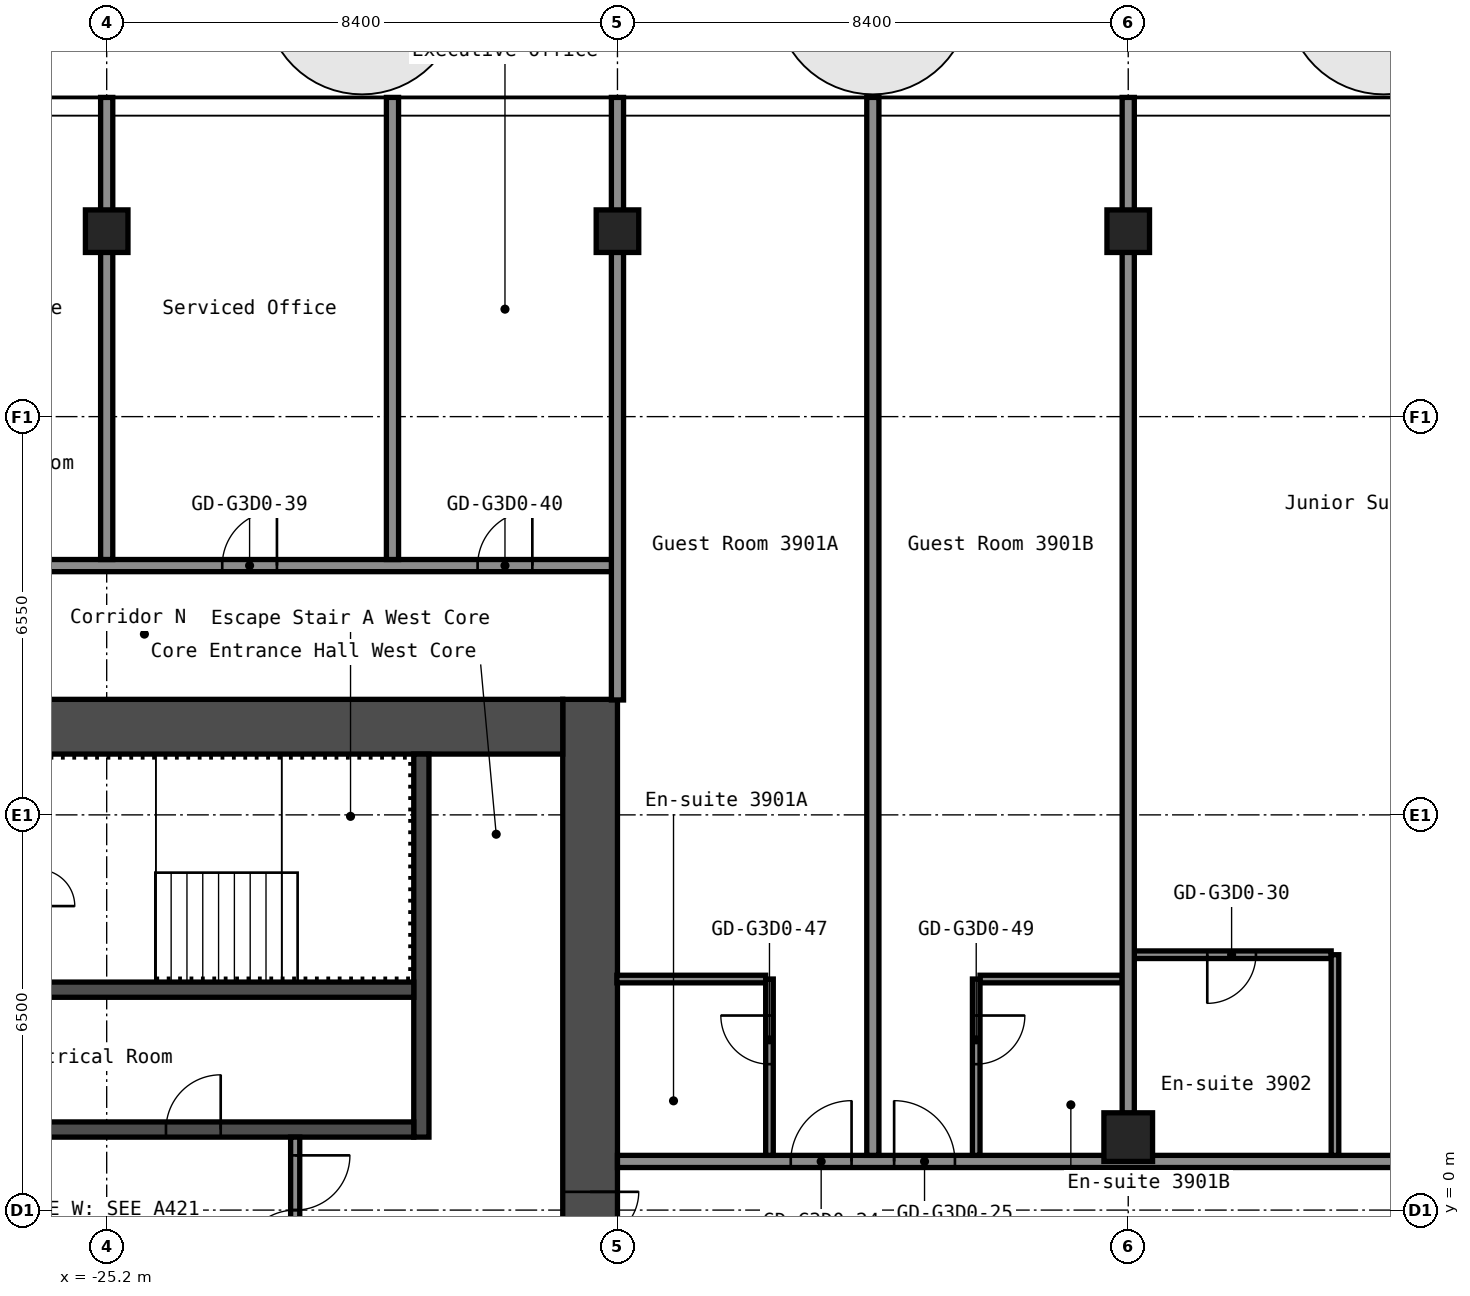
"""IFC4 building model, lengths in metres.
Left out: names, types, materials, properties, quantities, classifications, styles, units other than length and angle.
Written with IfcOpenShell. Run it as: python <this file> out.ifc"""

import sys

from ifc_helpers import new_model, si_unit, direction, frame, frame_2d, origin, origin_2d, place, context, subcontext, project, spatial, rectangle, hollow_rectangle, extrude, element, fill, save


model = new_model("IFC4")
c1 = context("Model", 3, precision=1e-05, world=origin(), true_north=direction((0.0, 1.0)))
c2 = subcontext(c1, "Body", "Model", "MODEL_VIEW")
j1 = project(units=[si_unit("LENGTHUNIT", "METRE"), si_unit("PLANEANGLEUNIT", "RADIAN")], contexts=[c1])
p1 = place(None, origin())
s1 = spatial("IfcSite", under=j1, at=p1, CompositionType="ELEMENT")
p2 = place(p1, origin())
s2 = spatial("IfcBuilding", under=s1, at=p2, CompositionType="ELEMENT")
p3 = place(p2, frame((0.0, 0.0, 140.6)))
s3 = spatial("IfcBuildingStorey", under=s2, at=p3, CompositionType="ELEMENT", Elevation=140.6)
for number, where, z_axis, x_axis in (
    (1, (-25.2, 16.1, 0.0), (0.0, 0.0, 1.0), (1.0, 0.0, 0.0)),
    (2, (-16.8, 16.1, 0.0), (0.0, 0.0, 1.0), (1.0, 0.0, 0.0)),
):
    element("IfcColumn", number, at=place(p3, frame(where, z_axis=z_axis, x_axis=x_axis)), inside=s3, PredefinedType="COLUMN", context=c2, shape_type="SweptSolid", body=[
        extrude(hollow_rectangle(XDim=0.7, YDim=0.7, WallThickness=0.028, at=origin_2d()), origin(), (0.0, 0.0, 1.0), 2.75),
    ])
p4 = place(p3, frame((-8.4, 1.2, 0.0), z_axis=(0.0, 0.0, 1.0), x_axis=(1.0, 0.0, 0.0)))
e3 = element("IfcColumn", 3, at=p4, inside=s3, PredefinedType="COLUMN", context=c2, shape_type="SweptSolid", body=[
    extrude(hollow_rectangle(XDim=0.8, YDim=0.8, WallThickness=0.032, at=origin_2d()), origin(), (0.0, 0.0, 1.0), 2.75),
])
p5 = place(p3, frame((-8.4, 16.1, 0.0), z_axis=(0.0, 0.0, 1.0), x_axis=(1.0, 0.0, 0.0)))
e4 = element("IfcColumn", 4, at=p5, inside=s3, PredefinedType="COLUMN", context=c2, shape_type="SweptSolid", body=[
    extrude(hollow_rectangle(XDim=0.7, YDim=0.7, WallThickness=0.028, at=origin_2d()), origin(), (0.0, 0.0, 1.0), 2.75),
])
p6 = place(p3, frame((-17.25, -8.4, 0.0), z_axis=(0.0, 0.0, 1.0), x_axis=(0.0, 1.0, 0.0)))
e5 = element("IfcWall", 5, at=p6, inside=s3, PredefinedType="SHEAR", context=c2, shape_type="SweptSolid", body=[
    extrude(rectangle(XDim=16.8, YDim=0.9, at=frame_2d((8.4, 0.0))), origin(), (0.0, 0.0, 1.0), 2.75),
])
p7 = place(p6, frame((7.1, 0.0, 0.0)))
e6 = element("IfcOpeningElement", 6, at=p7, cuts=e5, PredefinedType="OPENING", context=c2, shape_type="SweptSolid", body=[
    extrude(rectangle(XDim=1.6, YDim=2.1, at=frame_2d((0.8, 1.05))), frame((0.0, 0.46, 0.0), z_axis=(0.0, -1.0, 0.0), x_axis=(1.0, 0.0, 0.0)), (0.0, 0.0, 1.0), 0.92),
])
p8 = place(p3, frame((-32.7, 7.95, 0.0), z_axis=(0.0, 0.0, 1.0), x_axis=(1.0, 0.0, 0.0)))
e7 = element("IfcWall", 7, at=p8, inside=s3, PredefinedType="SHEAR", context=c2, shape_type="SweptSolid", body=[
    extrude(rectangle(XDim=15.0, YDim=0.9, at=frame_2d((7.5, 0.0))), origin(), (0.0, 0.0, 1.0), 2.75),
])
p9 = place(p8, frame((3.4, 0.0, 0.0)))
e8 = element("IfcOpeningElement", 8, at=p9, cuts=e7, PredefinedType="OPENING", context=c2, shape_type="SweptSolid", body=[
    extrude(rectangle(XDim=1.2, YDim=2.1, at=frame_2d((0.6, 1.05))), frame((0.0, 0.46, 0.0), z_axis=(0.0, -1.0, 0.0), x_axis=(1.0, 0.0, 0.0)), (0.0, 0.0, 1.0), 0.92),
])
p10 = place(p8, frame((0.75, 0.0, 0.0)))
e9 = element("IfcOpeningElement", 9, at=p10, cuts=e7, PredefinedType="OPENING", context=c2, shape_type="SweptSolid", body=[
    extrude(rectangle(XDim=0.9, YDim=2.1, at=frame_2d((0.45, 1.05))), frame((0.0, 0.46, 0.0), z_axis=(0.0, -1.0, 0.0), x_axis=(1.0, 0.0, 0.0)), (0.0, 0.0, 1.0), 0.92),
])
p11 = place(p3, frame((-20.025, 1.2, 0.0), z_axis=(0.0, 0.0, 1.0), x_axis=(0.0, 1.0, 0.0)))
e10 = element("IfcWall", 10, at=p11, inside=s3, PredefinedType="SHEAR", context=c2, shape_type="SweptSolid", body=[
    extrude(rectangle(XDim=6.3, YDim=0.25, at=frame_2d((3.15, 0.0))), origin(), (0.0, 0.0, 1.0), 2.75),
])
p12 = place(p3, frame((-27.65, 1.325, 0.0), z_axis=(0.0, 0.0, 1.0), x_axis=(1.0, 0.0, 0.0)))
e11 = element("IfcWall", 11, at=p12, inside=s3, PredefinedType="SHEAR", context=c2, shape_type="SweptSolid", body=[
    extrude(rectangle(XDim=7.5, YDim=0.25, at=frame_2d((3.75, 0.0))), origin(), (0.0, 0.0, 1.0), 2.75),
])
p13 = place(p12, frame((3.425, 0.0, 0.0)))
e12 = element("IfcOpeningElement", 12, at=p13, cuts=e11, PredefinedType="OPENING", context=c2, shape_type="SweptSolid", body=[
    extrude(rectangle(XDim=0.9, YDim=2.1, at=frame_2d((0.45, 1.05))), frame((0.0, 0.135, 0.0), z_axis=(0.0, -1.0, 0.0), x_axis=(1.0, 0.0, 0.0)), (0.0, 0.0, 1.0), 0.27),
])
p14 = place(p3, frame((-27.65, 3.625, 0.0), z_axis=(0.0, 0.0, 1.0), x_axis=(1.0, 0.0, 0.0)))
e13 = element("IfcWall", 13, at=p14, inside=s3, PredefinedType="SHEAR", context=c2, shape_type="SweptSolid", body=[
    extrude(rectangle(XDim=7.5, YDim=0.25, at=frame_2d((3.75, 0.0))), origin(), (0.0, 0.0, 1.0), 2.75),
])
p15 = place(p3, frame((-22.1, -1.2, 0.0), z_axis=(0.0, 0.0, 1.0), x_axis=(0.0, 1.0, 0.0)))
e14 = element("IfcWall", 14, at=p15, inside=s3, PredefinedType="PARTITIONING", context=c2, shape_type="SweptSolid", body=[
    extrude(rectangle(XDim=2.4, YDim=0.15, at=frame_2d((1.2, 0.0))), origin(), (0.0, 0.0, 1.0), 2.75),
])
p16 = place(p15, frame((0.3, 0.0, 0.0)))
e15 = element("IfcOpeningElement", 15, at=p16, cuts=e14, PredefinedType="OPENING", context=c2, shape_type="SweptSolid", body=[
    extrude(rectangle(XDim=1.8, YDim=2.1, at=frame_2d((0.9, 1.05))), frame((0.0, 0.085, 0.0), z_axis=(0.0, -1.0, 0.0), x_axis=(1.0, 0.0, 0.0)), (0.0, 0.0, 1.0), 0.17),
])
p17 = place(p3, frame((-16.8, 0.8, 0.0), z_axis=(0.0, 0.0, 1.0), x_axis=(1.0, 0.0, 0.0)))
e16 = element("IfcWall", 16, at=p17, inside=s3, PredefinedType="PARTITIONING", context=c2, shape_type="SweptSolid", body=[
    extrude(rectangle(XDim=33.6, YDim=0.2, at=frame_2d((16.8, 0.0))), origin(), (0.0, 0.0, 1.0), 2.75),
])
p18 = place(p17, frame((2.85, 0.0, 0.0)))
e17 = element("IfcOpeningElement", 17, at=p18, cuts=e16, PredefinedType="OPENING", context=c2, shape_type="SweptSolid", body=[
    extrude(rectangle(XDim=1.0, YDim=2.1, at=frame_2d((0.5, 1.05))), frame((0.0, 0.11, 0.0), z_axis=(0.0, -1.0, 0.0), x_axis=(1.0, 0.0, 0.0)), (0.0, 0.0, 1.0), 0.22),
])
p19 = place(p17, frame((4.55, 0.0, 0.0)))
e18 = element("IfcOpeningElement", 18, at=p19, cuts=e16, PredefinedType="OPENING", context=c2, shape_type="SweptSolid", body=[
    extrude(rectangle(XDim=1.0, YDim=2.1, at=frame_2d((0.5, 1.05))), frame((0.0, 0.11, 0.0), z_axis=(0.0, -1.0, 0.0), x_axis=(1.0, 0.0, 0.0)), (0.0, 0.0, 1.0), 0.22),
])
p20 = place(p17, frame((13.8, 0.0, 0.0)))
e19 = element("IfcOpeningElement", 19, at=p20, cuts=e16, PredefinedType="OPENING", context=c2, shape_type="SweptSolid", body=[
    extrude(rectangle(XDim=1.0, YDim=2.1, at=frame_2d((0.5, 1.05))), frame((0.0, 0.11, 0.0), z_axis=(0.0, -1.0, 0.0), x_axis=(1.0, 0.0, 0.0)), (0.0, 0.0, 1.0), 0.22),
])
p21 = place(p17, frame((19.65, 0.0, 0.0)))
e20 = element("IfcOpeningElement", 20, at=p21, cuts=e16, PredefinedType="OPENING", context=c2, shape_type="SweptSolid", body=[
    extrude(rectangle(XDim=1.0, YDim=2.1, at=frame_2d((0.5, 1.05))), frame((0.0, 0.11, 0.0), z_axis=(0.0, -1.0, 0.0), x_axis=(1.0, 0.0, 0.0)), (0.0, 0.0, 1.0), 0.22),
])
p22 = place(p17, frame((21.35, 0.0, 0.0)))
e21 = element("IfcOpeningElement", 21, at=p22, cuts=e16, PredefinedType="OPENING", context=c2, shape_type="SweptSolid", body=[
    extrude(rectangle(XDim=1.0, YDim=2.1, at=frame_2d((0.5, 1.05))), frame((0.0, 0.11, 0.0), z_axis=(0.0, -1.0, 0.0), x_axis=(1.0, 0.0, 0.0)), (0.0, 0.0, 1.0), 0.22),
])
p23 = place(p17, frame((27.1, 0.0, 0.0)))
e22 = element("IfcOpeningElement", 22, at=p23, cuts=e16, PredefinedType="OPENING", context=c2, shape_type="SweptSolid", body=[
    extrude(rectangle(XDim=1.0, YDim=2.1, at=frame_2d((0.5, 1.05))), frame((0.0, 0.11, 0.0), z_axis=(0.0, -1.0, 0.0), x_axis=(1.0, 0.0, 0.0)), (0.0, 0.0, 1.0), 0.22),
])
p24 = place(p3, frame((-16.81, 3.8, 0.0), z_axis=(0.0, 0.0, 1.0), x_axis=(1.0, 0.0, 0.0)))
e23 = element("IfcWall", 23, at=p24, inside=s3, PredefinedType="PARTITIONING", context=c2, shape_type="SweptSolid", body=[
    extrude(rectangle(XDim=2.448, YDim=0.125, at=frame_2d((1.224, 0.0))), origin(), (0.0, 0.0, 1.0), 2.75),
])
p25 = place(p3, frame((-10.837, 3.8, 0.0), z_axis=(0.0, 0.0, 1.0), x_axis=(1.0, 0.0, 0.0)))
e24 = element("IfcWall", 24, at=p25, inside=s3, PredefinedType="PARTITIONING", context=c2, shape_type="SweptSolid", body=[
    extrude(rectangle(XDim=2.337, YDim=0.125, at=frame_2d((1.169, 0.0))), origin(), (0.0, 0.0, 1.0), 2.75),
])
p26 = place(p3, frame((-8.3, 4.2, 0.0), z_axis=(0.0, 0.0, 1.0), x_axis=(1.0, 0.0, 0.0)))
e25 = element("IfcWall", 25, at=p26, inside=s3, PredefinedType="PARTITIONING", context=c2, shape_type="SweptSolid", body=[
    extrude(rectangle(XDim=3.238, YDim=0.125, at=frame_2d((1.619, 0.0))), origin(), (0.0, 0.0, 1.0), 2.75),
])
p27 = place(p26, frame((1.2, 0.0, 0.0)))
e26 = element("IfcOpeningElement", 26, at=p27, cuts=e25, PredefinedType="OPENING", context=c2, shape_type="SweptSolid", body=[
    extrude(rectangle(XDim=0.8, YDim=2.1, at=frame_2d((0.4, 1.05))), frame((0.0, 0.073, 0.0), z_axis=(0.0, -1.0, 0.0), x_axis=(1.0, 0.0, 0.0)), (0.0, 0.0, 1.0), 0.145),
])
p28 = place(p3, frame((-42.7, 10.6, 0.0), z_axis=(0.0, 0.0, 1.0), x_axis=(1.0, 0.0, 0.0)))
e27 = element("IfcWall", 27, at=p28, inside=s3, PredefinedType="PARTITIONING", context=c2, shape_type="SweptSolid", body=[
    extrude(rectangle(XDim=25.9, YDim=0.2, at=frame_2d((12.95, 0.0))), origin(), (0.0, 0.0, 1.0), 2.75),
])
p29 = place(p28, frame((1.7, 0.0, 0.0)))
e28 = element("IfcOpeningElement", 28, at=p29, cuts=e27, PredefinedType="OPENING", context=c2, shape_type="SweptSolid", body=[
    extrude(rectangle(XDim=0.9, YDim=2.1, at=frame_2d((0.45, 1.05))), frame((0.0, 0.11, 0.0), z_axis=(0.0, -1.0, 0.0), x_axis=(1.0, 0.0, 0.0)), (0.0, 0.0, 1.0), 0.22),
])
p30 = place(p28, frame((6.1, 0.0, 0.0)))
e29 = element("IfcOpeningElement", 29, at=p30, cuts=e27, PredefinedType="OPENING", context=c2, shape_type="SweptSolid", body=[
    extrude(rectangle(XDim=0.9, YDim=2.1, at=frame_2d((0.45, 1.05))), frame((0.0, 0.11, 0.0), z_axis=(0.0, -1.0, 0.0), x_axis=(1.0, 0.0, 0.0)), (0.0, 0.0, 1.0), 0.22),
])
p31 = place(p28, frame((10.58, 0.0, 0.0)))
e30 = element("IfcOpeningElement", 30, at=p31, cuts=e27, PredefinedType="OPENING", context=c2, shape_type="SweptSolid", body=[
    extrude(rectangle(XDim=0.9, YDim=2.1, at=frame_2d((0.45, 1.05))), frame((0.0, 0.11, 0.0), z_axis=(0.0, -1.0, 0.0), x_axis=(1.0, 0.0, 0.0)), (0.0, 0.0, 1.0), 0.22),
])
p32 = place(p28, frame((14.78, 0.0, 0.0)))
e31 = element("IfcOpeningElement", 31, at=p32, cuts=e27, PredefinedType="OPENING", context=c2, shape_type="SweptSolid", body=[
    extrude(rectangle(XDim=0.9, YDim=2.1, at=frame_2d((0.45, 1.05))), frame((0.0, 0.11, 0.0), z_axis=(0.0, -1.0, 0.0), x_axis=(1.0, 0.0, 0.0)), (0.0, 0.0, 1.0), 0.22),
])
p33 = place(p28, frame((19.4, 0.0, 0.0)))
e32 = element("IfcOpeningElement", 32, at=p33, cuts=e27, PredefinedType="OPENING", context=c2, shape_type="SweptSolid", body=[
    extrude(rectangle(XDim=0.9, YDim=2.1, at=frame_2d((0.45, 1.05))), frame((0.0, 0.11, 0.0), z_axis=(0.0, -1.0, 0.0), x_axis=(1.0, 0.0, 0.0)), (0.0, 0.0, 1.0), 0.22),
])
p34 = place(p28, frame((23.6, 0.0, 0.0)))
e33 = element("IfcOpeningElement", 33, at=p34, cuts=e27, PredefinedType="OPENING", context=c2, shape_type="SweptSolid", body=[
    extrude(rectangle(XDim=0.9, YDim=2.1, at=frame_2d((0.45, 1.05))), frame((0.0, 0.11, 0.0), z_axis=(0.0, -1.0, 0.0), x_axis=(1.0, 0.0, 0.0)), (0.0, 0.0, 1.0), 0.22),
])
for number, where, z_axis, x_axis in (
    (34, (-25.2, 10.7, 0.0), (0.0, 0.0, 1.0), (0.0, 1.0, 0.0)),
    (35, (-20.5, 10.7, 0.0), (0.0, 0.0, 1.0), (0.0, 1.0, 0.0)),
):
    element("IfcWall", number, at=place(p3, frame(where, z_axis=z_axis, x_axis=x_axis)), inside=s3, PredefinedType="PARTITIONING", context=c2, shape_type="SweptSolid", body=[
        extrude(rectangle(XDim=7.6, YDim=0.2, at=frame_2d((3.8, 0.0))), origin(), (0.0, 0.0, 1.0), 2.75),
    ])
p35 = place(p3, frame((-16.8, 8.39, 0.0), z_axis=(0.0, 0.0, 1.0), x_axis=(0.0, 1.0, 0.0)))
e36 = element("IfcWall", 36, at=p35, inside=s3, PredefinedType="PARTITIONING", context=c2, shape_type="SweptSolid", body=[
    extrude(rectangle(XDim=9.91, YDim=0.2, at=frame_2d((4.955, 0.0))), origin(), (0.0, 0.0, 1.0), 2.75),
])
p36 = place(p3, frame((-14.3, 0.9, 0.0), z_axis=(0.0, 0.0, 1.0), x_axis=(0.0, 1.0, 0.0)))
e37 = element("IfcWall", 37, at=p36, inside=s3, PredefinedType="PARTITIONING", context=c2, shape_type="SweptSolid", body=[
    extrude(rectangle(XDim=2.9, YDim=0.125, at=frame_2d((1.45, 0.0))), origin(), (0.0, 0.0, 1.0), 2.75),
])
p37 = place(p36, frame((1.5, 0.0, 0.0)))
e38 = element("IfcOpeningElement", 38, at=p37, cuts=e37, PredefinedType="OPENING", context=c2, shape_type="SweptSolid", body=[
    extrude(rectangle(XDim=0.8, YDim=2.1, at=frame_2d((0.4, 1.05))), frame((0.0, 0.073, 0.0), z_axis=(0.0, -1.0, 0.0), x_axis=(1.0, 0.0, 0.0)), (0.0, 0.0, 1.0), 0.145),
])
p38 = place(p3, frame((-12.6, 0.9, 0.0), z_axis=(0.0, 0.0, 1.0), x_axis=(0.0, 1.0, 0.0)))
e39 = element("IfcWall", 39, at=p38, inside=s3, PredefinedType="PARTITIONING", context=c2, shape_type="SweptSolid", body=[
    extrude(rectangle(XDim=17.4, YDim=0.2, at=frame_2d((8.7, 0.0))), origin(), (0.0, 0.0, 1.0), 2.75),
])
p39 = place(p3, frame((-10.9, 0.9, 0.0), z_axis=(0.0, 0.0, 1.0), x_axis=(0.0, 1.0, 0.0)))
e40 = element("IfcWall", 40, at=p39, inside=s3, PredefinedType="PARTITIONING", context=c2, shape_type="SweptSolid", body=[
    extrude(rectangle(XDim=2.9, YDim=0.125, at=frame_2d((1.45, 0.0))), origin(), (0.0, 0.0, 1.0), 2.75),
])
p40 = place(p39, frame((1.5, 0.0, 0.0)))
e41 = element("IfcOpeningElement", 41, at=p40, cuts=e40, PredefinedType="OPENING", context=c2, shape_type="SweptSolid", body=[
    extrude(rectangle(XDim=0.8, YDim=2.1, at=frame_2d((0.4, 1.05))), frame((0.0, 0.073, 0.0), z_axis=(0.0, -1.0, 0.0), x_axis=(1.0, 0.0, 0.0)), (0.0, 0.0, 1.0), 0.145),
])
p41 = place(p3, frame((-8.4, 1.59, 0.0), z_axis=(0.0, 0.0, 1.0), x_axis=(0.0, 1.0, 0.0)))
e42 = element("IfcWall", 42, at=p41, inside=s3, PredefinedType="PARTITIONING", context=c2, shape_type="SweptSolid", body=[
    extrude(rectangle(XDim=16.71, YDim=0.2, at=frame_2d((8.355, 0.0))), origin(), (0.0, 0.0, 1.0), 2.75),
])
p42 = place(p3, frame((-5.0, 0.9, 0.0), z_axis=(0.0, 0.0, 1.0), x_axis=(0.0, 1.0, 0.0)))
e43 = element("IfcWall", 43, at=p42, inside=s3, PredefinedType="PARTITIONING", context=c2, shape_type="SweptSolid", body=[
    extrude(rectangle(XDim=3.3, YDim=0.125, at=frame_2d((1.65, 0.0))), origin(), (0.0, 0.0, 1.0), 2.75),
])
p43 = place(p7, origin())
e44 = element("IfcDoor", 44, at=p43, inside=s3, OperationType="DOUBLE_DOOR_SINGLE_SWING", PredefinedType="DOOR", context=c2, shape_type="SweptSolid", body=[
    extrude(rectangle(XDim=1.6, YDim=2.1, at=frame_2d((0.8, 1.05))), frame((0.0, 0.025, 0.0), z_axis=(0.0, -1.0, 0.0), x_axis=(1.0, 0.0, 0.0)), (0.0, 0.0, 1.0), 0.05),
])
fill(e6, e44)
p44 = place(p16, origin())
e45 = element("IfcDoor", 45, at=p44, inside=s3, OperationType="DOUBLE_DOOR_SINGLE_SWING", PredefinedType="DOOR", context=c2, shape_type="SweptSolid", body=[
    extrude(rectangle(XDim=1.8, YDim=2.1, at=frame_2d((0.9, 1.05))), frame((0.0, 0.025, 0.0), z_axis=(0.0, -1.0, 0.0), x_axis=(1.0, 0.0, 0.0)), (0.0, 0.0, 1.0), 0.05),
])
fill(e15, e45)
p45 = place(p13, origin())
e46 = element("IfcDoor", 46, at=p45, inside=s3, OperationType="SINGLE_SWING_LEFT", PredefinedType="DOOR", context=c2, shape_type="SweptSolid", body=[
    extrude(rectangle(XDim=0.9, YDim=2.1, at=frame_2d((0.45, 1.05))), frame((0.0, 0.025, 0.0), z_axis=(0.0, -1.0, 0.0), x_axis=(1.0, 0.0, 0.0)), (0.0, 0.0, 1.0), 0.05),
])
fill(e12, e46)
p46 = place(p18, origin())
e47 = element("IfcDoor", 47, at=p46, inside=s3, OperationType="SINGLE_SWING_LEFT", PredefinedType="DOOR", context=c2, shape_type="SweptSolid", body=[
    extrude(rectangle(XDim=1.0, YDim=2.1, at=frame_2d((0.5, 1.05))), frame((0.0, 0.025, 0.0), z_axis=(0.0, -1.0, 0.0), x_axis=(1.0, 0.0, 0.0)), (0.0, 0.0, 1.0), 0.05),
])
fill(e17, e47)
p47 = place(p19, origin())
e48 = element("IfcDoor", 48, at=p47, inside=s3, OperationType="SINGLE_SWING_RIGHT", PredefinedType="DOOR", context=c2, shape_type="SweptSolid", body=[
    extrude(rectangle(XDim=1.0, YDim=2.1, at=frame_2d((0.5, 1.05))), frame((0.0, 0.025, 0.0), z_axis=(0.0, -1.0, 0.0), x_axis=(1.0, 0.0, 0.0)), (0.0, 0.0, 1.0), 0.05),
])
fill(e18, e48)
p48 = place(p27, origin())
e49 = element("IfcDoor", 49, at=p48, inside=s3, OperationType="SINGLE_SWING_LEFT", PredefinedType="DOOR", context=c2, shape_type="SweptSolid", body=[
    extrude(rectangle(XDim=0.8, YDim=2.1, at=frame_2d((0.4, 1.05))), frame((0.0, 0.025, 0.0), z_axis=(0.0, -1.0, 0.0), x_axis=(1.0, 0.0, 0.0)), (0.0, 0.0, 1.0), 0.05),
])
fill(e26, e49)
p49 = place(p33, origin())
e50 = element("IfcDoor", 50, at=p49, inside=s3, OperationType="SINGLE_SWING_LEFT", PredefinedType="DOOR", context=c2, shape_type="SweptSolid", body=[
    extrude(rectangle(XDim=0.9, YDim=2.1, at=frame_2d((0.45, 1.05))), frame((0.0, 0.025, 0.0), z_axis=(0.0, -1.0, 0.0), x_axis=(1.0, 0.0, 0.0)), (0.0, 0.0, 1.0), 0.05),
])
fill(e32, e50)
p50 = place(p34, origin())
e51 = element("IfcDoor", 51, at=p50, inside=s3, OperationType="SINGLE_SWING_LEFT", PredefinedType="DOOR", context=c2, shape_type="SweptSolid", body=[
    extrude(rectangle(XDim=0.9, YDim=2.1, at=frame_2d((0.45, 1.05))), frame((0.0, 0.025, 0.0), z_axis=(0.0, -1.0, 0.0), x_axis=(1.0, 0.0, 0.0)), (0.0, 0.0, 1.0), 0.05),
])
fill(e33, e51)
p51 = place(p37, origin())
e52 = element("IfcDoor", 52, at=p51, inside=s3, OperationType="SINGLE_SWING_LEFT", PredefinedType="DOOR", context=c2, shape_type="SweptSolid", body=[
    extrude(rectangle(XDim=0.8, YDim=2.1, at=frame_2d((0.4, 1.05))), frame((0.0, 0.025, 0.0), z_axis=(0.0, -1.0, 0.0), x_axis=(1.0, 0.0, 0.0)), (0.0, 0.0, 1.0), 0.05),
])
fill(e38, e52)
p52 = place(p40, origin())
e53 = element("IfcDoor", 53, at=p52, inside=s3, OperationType="SINGLE_SWING_RIGHT", PredefinedType="DOOR", context=c2, shape_type="SweptSolid", body=[
    extrude(rectangle(XDim=0.8, YDim=2.1, at=frame_2d((0.4, 1.05))), frame((0.0, 0.025, 0.0), z_axis=(0.0, -1.0, 0.0), x_axis=(1.0, 0.0, 0.0)), (0.0, 0.0, 1.0), 0.05),
])
fill(e41, e53)
save(model, sys.argv[1])
